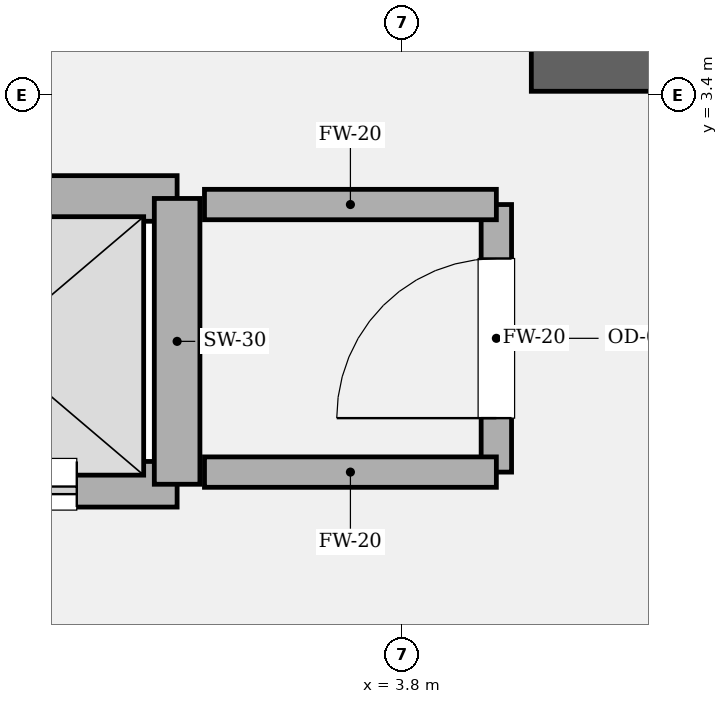
"""IFC4 building model, lengths in metres.
Left out: names, types, materials, properties, quantities, classifications, styles, units other than length and angle.
Written with IfcOpenShell. Run it as: python <this file> out.ifc"""

import sys

from ifc_helpers import new_model, si_unit, direction, frame, frame_2d, origin, place, context, subcontext, project, spatial, rectangle, extrude, element, fill, save


model = new_model("IFC4")
c1 = context("Model", 3, precision=1e-05, world=origin(), true_north=direction((0.0, 1.0)))
c2 = subcontext(c1, "Body", "Model", "MODEL_VIEW")
j1 = project(units=[si_unit("LENGTHUNIT", "METRE"), si_unit("PLANEANGLEUNIT", "RADIAN")], contexts=[c1])
p1 = place(None, origin())
s1 = spatial("IfcSite", under=j1, at=p1, CompositionType="ELEMENT")
p2 = place(p1, origin())
s2 = spatial("IfcBuilding", under=s1, at=p2, CompositionType="ELEMENT")
p3 = place(p2, frame((0.0, 0.0, 300.6)))
s3 = spatial("IfcBuildingStorey", under=s2, at=p3, CompositionType="ELEMENT", Elevation=300.6)
p4 = place(p3, frame((4.65, 3.6, 0.0), z_axis=(0.0, 0.0, 1.0), x_axis=(1.0, 0.0, 0.0)))
e1 = element("IfcWall", 1, at=p4, inside=s3, PredefinedType="SOLIDWALL", context=c2, shape_type="SweptSolid", body=[
    extrude(rectangle(XDim=5.275, YDim=0.35, at=frame_2d((2.638, 0.0))), origin(), (0.0, 0.0, 1.0), 4.2),
])
p5 = place(p3, frame((-2.32, 0.84, 0.0), z_axis=(0.0, 0.0, 1.0), x_axis=(1.0, 0.0, 0.0)))
e2 = element("IfcWall", 2, at=p5, inside=s3, PredefinedType="SOLIDWALL", context=c2, shape_type="SweptSolid", body=[
    extrude(rectangle(XDim=4.64, YDim=0.3, at=frame_2d((2.32, 0.0))), origin(), (0.0, 0.0, 1.0), 4.0),
])
p6 = place(p5, frame((0.66, 0.0, 0.0)))
e3 = element("IfcOpeningElement", 3, at=p6, cuts=e2, PredefinedType="OPENING", context=c2, shape_type="SweptSolid", body=[
    extrude(rectangle(XDim=1.12, YDim=2.25, at=frame_2d((0.56, 1.125))), frame((0.0, 0.16, 0.0), z_axis=(0.0, -1.0, 0.0), x_axis=(1.0, 0.0, 0.0)), (0.0, 0.0, 1.0), 0.32),
])
p7 = place(p5, frame((2.86, 0.0, 0.0)))
e4 = element("IfcOpeningElement", 4, at=p7, cuts=e2, PredefinedType="OPENING", context=c2, shape_type="SweptSolid", body=[
    extrude(rectangle(XDim=1.12, YDim=2.25, at=frame_2d((0.56, 1.125))), frame((0.0, 0.16, 0.0), z_axis=(0.0, -1.0, 0.0), x_axis=(1.0, 0.0, 0.0)), (0.0, 0.0, 1.0), 0.32),
])
p8 = place(p3, frame((-2.32, 2.72, 0.0), z_axis=(0.0, 0.0, 1.0), x_axis=(1.0, 0.0, 0.0)))
e5 = element("IfcWall", 5, at=p8, inside=s3, PredefinedType="SOLIDWALL", context=c2, shape_type="SweptSolid", body=[
    extrude(rectangle(XDim=4.64, YDim=0.3, at=frame_2d((2.32, 0.0))), origin(), (0.0, 0.0, 1.0), 4.0),
])
p9 = place(p3, frame((2.32, 0.84, 0.0), z_axis=(0.0, 0.0, 1.0), x_axis=(0.0, 1.0, 0.0)))
e6 = element("IfcWall", 6, at=p9, inside=s3, PredefinedType="SOLIDWALL", context=c2, shape_type="SweptSolid", body=[
    extrude(rectangle(XDim=1.88, YDim=0.3, at=frame_2d((0.94, 0.0))), origin(), (0.0, 0.0, 1.0), 4.0),
])
p10 = place(p3, frame((4.42, 0.92, 0.0), z_axis=(0.0, 0.0, 1.0), x_axis=(0.0, 1.0, 0.0)))
e7 = element("IfcWall", 7, at=p10, inside=s3, PredefinedType="SOLIDWALL", context=c2, shape_type="SweptSolid", body=[
    extrude(rectangle(XDim=1.76, YDim=0.2, at=frame_2d((0.88, 0.0))), origin(), (0.0, 0.0, 1.0), 4.0),
])
p11 = place(p10, frame((0.355, 0.0, 0.0)))
e8 = element("IfcOpeningElement", 8, at=p11, cuts=e7, PredefinedType="OPENING", context=c2, shape_type="SweptSolid", body=[
    extrude(rectangle(XDim=1.05, YDim=2.2, at=frame_2d((0.525, 1.1))), frame((0.0, 0.11, 0.0), z_axis=(0.0, -1.0, 0.0), x_axis=(1.0, 0.0, 0.0)), (0.0, 0.0, 1.0), 0.22),
])
for number, where, z_axis, x_axis in (
    (9, (4.42, 2.68, 0.0), (0.0, 0.0, 1.0), (-1.0, 0.0, 0.0)),
    (10, (2.5, 0.92, 0.0), (0.0, 0.0, 1.0), (1.0, 0.0, 0.0)),
):
    element("IfcWall", number, at=place(p3, frame(where, z_axis=z_axis, x_axis=x_axis)), inside=s3, PredefinedType="SOLIDWALL", context=c2, shape_type="SweptSolid", body=[
        extrude(rectangle(XDim=1.92, YDim=0.2, at=frame_2d((0.96, 0.0))), origin(), (0.0, 0.0, 1.0), 4.0),
    ])
p12 = place(p7, origin())
e11 = element("IfcDoor", 11, at=p12, inside=s3, OperationType="DOUBLE_DOOR_SLIDING", PredefinedType="DOOR", context=c2, shape_type="SweptSolid", body=[
    extrude(rectangle(XDim=1.12, YDim=2.25, at=frame_2d((0.56, 1.125))), frame((0.0, 0.025, 0.0), z_axis=(0.0, -1.0, 0.0), x_axis=(1.0, 0.0, 0.0)), (0.0, 0.0, 1.0), 0.05),
])
fill(e4, e11)
p13 = place(p11, origin())
e12 = element("IfcDoor", 12, at=p13, inside=s3, OperationType="SINGLE_SWING_LEFT", PredefinedType="DOOR", context=c2, shape_type="SweptSolid", body=[
    extrude(rectangle(XDim=1.05, YDim=2.2, at=frame_2d((0.525, 1.1))), frame((0.0, 0.025, 0.0), z_axis=(0.0, -1.0, 0.0), x_axis=(1.0, 0.0, 0.0)), (0.0, 0.0, 1.0), 0.05),
])
fill(e8, e12)
save(model, sys.argv[1])
